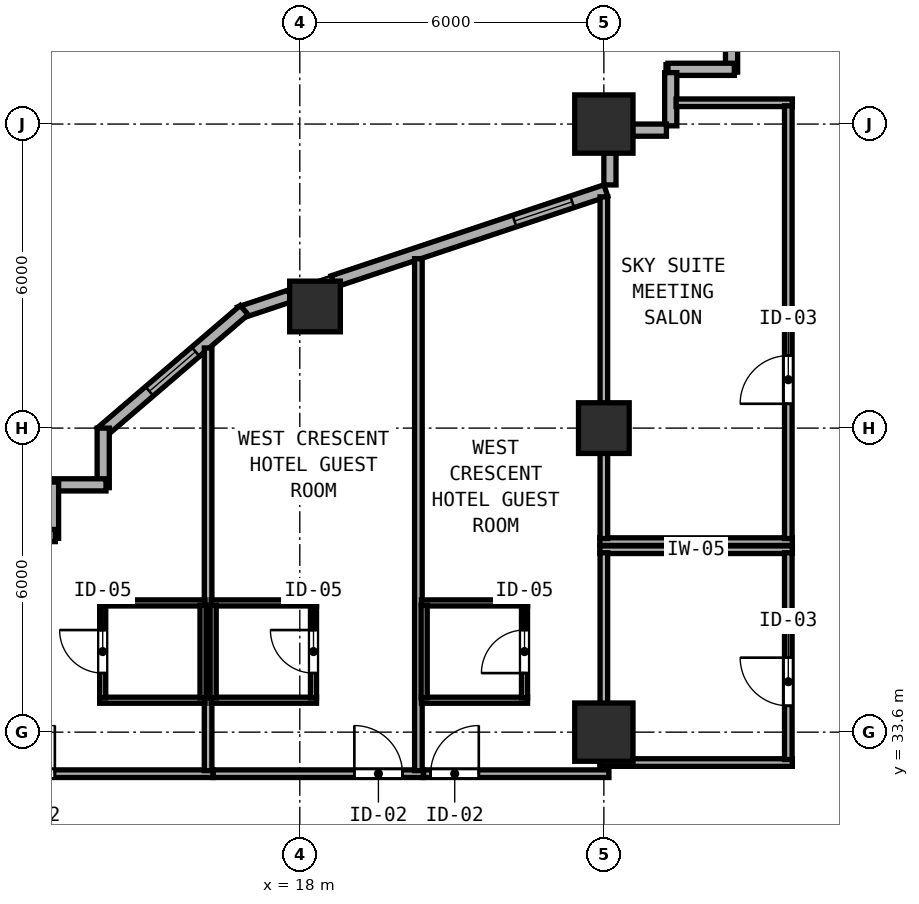
"""IFC4 building model, lengths in metres.
Left out: names, types, materials, properties, quantities, classifications, styles, units other than length and angle.
Written with IfcOpenShell. Run it as: python <this file> out.ifc"""

import sys

from ifc_helpers import new_model, si_unit, direction, frame, frame_2d, origin, origin_2d, place, context, subcontext, project, spatial, rectangle, hollow_rectangle, extrude, element, fill, save


model = new_model("IFC4")
c1 = context("Model", 3, precision=1e-05, world=origin(), true_north=direction((0.0, 1.0)))
c2 = subcontext(c1, "Body", "Model", "MODEL_VIEW")
j1 = project(units=[si_unit("LENGTHUNIT", "METRE"), si_unit("PLANEANGLEUNIT", "RADIAN")], contexts=[c1])
p1 = place(None, origin())
s1 = spatial("IfcSite", under=j1, at=p1, CompositionType="ELEMENT")
p2 = place(p1, origin())
s2 = spatial("IfcBuilding", under=s1, at=p2, CompositionType="ELEMENT")
p3 = place(p2, frame((0.0, 0.0, 81.8)))
s3 = spatial("IfcBuildingStorey", under=s2, at=p3, CompositionType="ELEMENT", Elevation=81.8)
for number, where, z_axis, x_axis in (
    (1, (24.0, 33.6, 0.0), (0.0, 0.0, 1.0), (1.0, 0.0, 0.0)),
    (2, (24.0, 45.6, 0.0), (0.0, 0.0, 1.0), (1.0, 0.0, 0.0)),
):
    element("IfcColumn", number, at=place(p3, frame(where, z_axis=z_axis, x_axis=x_axis)), inside=s3, PredefinedType="COLUMN", context=c2, shape_type="SweptSolid", body=[
        extrude(hollow_rectangle(XDim=1.15, YDim=1.15, WallThickness=0.042, at=origin_2d()), origin(), (0.0, 0.0, 1.0), 3.8),
    ])
for number, where, z_axis, x_axis in (
    (3, (24.0, 39.6, 0.0), (0.0, 0.0, 1.0), (1.0, 0.0, 0.0)),
    (4, (18.3, 42.0, 0.0), (0.0, 0.0, 1.0), (1.0, 0.0, 0.0)),
):
    element("IfcColumn", number, at=place(p3, frame(where, z_axis=z_axis, x_axis=x_axis)), inside=s3, PredefinedType="COLUMN", context=c2, shape_type="SweptSolid", body=[
        extrude(hollow_rectangle(XDim=1.0, YDim=1.0, WallThickness=0.038, at=origin_2d()), origin(), (0.0, 0.0, 1.0), 3.8),
    ])
p4 = place(p3, frame((26.52, 47.995, 0.0), z_axis=(0.0, 0.0, 1.0), x_axis=(0.0, -1.0, 0.0)))
e5 = element("IfcWall", 5, at=p4, inside=s3, PredefinedType="SOLIDWALL", context=c2, shape_type="SweptSolid", body=[
    extrude(rectangle(XDim=1.37, YDim=0.24, at=frame_2d((0.685, 0.0))), origin(), (0.0, 0.0, 1.0), 3.6),
])
p5 = place(p3, frame((26.575, 46.68, 0.0), z_axis=(0.0, 0.0, 1.0), x_axis=(-1.0, 0.0, 0.0)))
e6 = element("IfcWall", 6, at=p5, inside=s3, PredefinedType="SOLIDWALL", context=c2, shape_type="SweptSolid", body=[
    extrude(rectangle(XDim=1.31, YDim=0.24, at=frame_2d((0.655, 0.0))), origin(), (0.0, 0.0, 1.0), 3.6),
])
p6 = place(p3, frame((25.32, 46.615, 0.0), z_axis=(0.0, 0.0, 1.0), x_axis=(0.0, -1.0, 0.0)))
e7 = element("IfcWall", 7, at=p6, inside=s3, PredefinedType="SOLIDWALL", context=c2, shape_type="SweptSolid", body=[
    extrude(rectangle(XDim=1.05, YDim=0.24, at=frame_2d((0.525, 0.0))), origin(), (0.0, 0.0, 1.0), 3.6),
])
p7 = place(p3, frame((25.235, 45.48, 0.0), z_axis=(0.0, 0.0, 1.0), x_axis=(-1.0, 0.0, 0.0)))
e8 = element("IfcWall", 8, at=p7, inside=s3, PredefinedType="SOLIDWALL", context=c2, shape_type="SweptSolid", body=[
    extrude(rectangle(XDim=0.668, YDim=0.24, at=frame_2d((0.334, 0.0))), origin(), (0.0, 0.0, 1.0), 3.6),
])
p8 = place(p3, frame((24.12, 45.033, 0.0), z_axis=(0.0, 0.0, 1.0), x_axis=(0.0, -1.0, 0.0)))
e9 = element("IfcWall", 9, at=p8, inside=s3, PredefinedType="SOLIDWALL", context=c2, shape_type="SweptSolid", body=[
    extrude(rectangle(XDim=0.635, YDim=0.24, at=frame_2d((0.317, 0.0))), origin(), (0.0, 0.0, 1.0), 3.097),
])
p9 = place(p3, frame((24.039, 44.287, 0.0), z_axis=(0.0, 0.0, 1.0), x_axis=(-0.948678995954, -0.316240672014, 0.0)))
e10 = element("IfcWall", 10, at=p9, inside=s3, PredefinedType="SOLIDWALL", context=c2, shape_type="SweptSolid", body=[
    extrude(rectangle(XDim=5.675, YDim=0.24, at=frame_2d((2.837, 0.0))), origin(), (0.0, 0.0, 1.0), 3.097),
])
p10 = place(p9, frame((0.7, 0.0, 0.85)))
e11 = element("IfcOpeningElement", 11, at=p10, cuts=e10, PredefinedType="OPENING", context=c2, shape_type="SweptSolid", body=[
    extrude(rectangle(XDim=1.2, YDim=1.85, at=frame_2d((0.6, 0.925))), frame((0.0, 0.13, 0.0), z_axis=(0.0, -1.0, 0.0), x_axis=(1.0, 0.0, 0.0)), (0.0, 0.0, 1.0), 0.26),
])
p11 = place(p3, frame((17.808, 42.209, 0.0), z_axis=(0.0, 0.0, 1.0), x_axis=(-0.948706457285, -0.316158279832, 0.0)))
e12 = element("IfcWall", 12, at=p11, inside=s3, PredefinedType="SOLIDWALL", context=c2, shape_type="SweptSolid", body=[
    extrude(rectangle(XDim=1.054, YDim=0.24, at=frame_2d((0.527, 0.0))), origin(), (0.0, 0.0, 1.0), 3.6),
])
p12 = place(p3, frame((16.902, 41.929, 0.0), z_axis=(0.0, 0.0, 1.0), x_axis=(-0.759275136126, -0.650769750112, 0.0)))
e13 = element("IfcWall", 13, at=p12, inside=s3, PredefinedType="SOLIDWALL", context=c2, shape_type="SweptSolid", body=[
    extrude(rectangle(XDim=3.719, YDim=0.24, at=frame_2d((1.86, 0.0))), origin(), (0.0, 0.0, 1.0), 3.6),
])
p13 = place(p12, frame((1.263, 0.0, 0.85)))
e14 = element("IfcOpeningElement", 14, at=p13, cuts=e13, PredefinedType="OPENING", context=c2, shape_type="SweptSolid", body=[
    extrude(rectangle(XDim=1.2, YDim=1.85, at=frame_2d((0.6, 0.925))), frame((0.0, 0.13, 0.0), z_axis=(0.0, -1.0, 0.0), x_axis=(1.0, 0.0, 0.0)), (0.0, 0.0, 1.0), 0.26),
])
p14 = place(p3, frame((14.12, 39.6, 0.0), z_axis=(0.0, 0.0, 1.0), x_axis=(0.0, -1.0, 0.0)))
e15 = element("IfcWall", 15, at=p14, inside=s3, PredefinedType="SOLIDWALL", context=c2, shape_type="SweptSolid", body=[
    extrude(rectangle(XDim=1.175, YDim=0.24, at=frame_2d((0.587, 0.0))), origin(), (0.0, 0.0, 1.0), 3.6),
])
p15 = place(p3, frame((14.175, 38.48, 0.0), z_axis=(0.0, 0.0, 1.0), x_axis=(-1.0, 0.0, 0.0)))
e16 = element("IfcWall", 16, at=p15, inside=s3, PredefinedType="SOLIDWALL", context=c2, shape_type="SweptSolid", body=[
    extrude(rectangle(XDim=1.11, YDim=0.24, at=frame_2d((0.555, 0.0))), origin(), (0.0, 0.0, 1.0), 3.6),
])
p16 = place(p3, frame((13.12, 38.535, 0.0), z_axis=(0.0, 0.0, 1.0), x_axis=(0.0, -1.0, 0.0)))
e17 = element("IfcWall", 17, at=p16, inside=s3, PredefinedType="SOLIDWALL", context=c2, shape_type="SweptSolid", body=[
    extrude(rectangle(XDim=1.11, YDim=0.24, at=frame_2d((0.555, 0.0))), origin(), (0.0, 0.0, 1.0), 3.6),
])
p17 = place(p3, frame((13.175, 37.48, 0.0), z_axis=(0.0, 0.0, 1.0), x_axis=(-1.0, 0.0, 0.0)))
e18 = element("IfcWall", 18, at=p17, inside=s3, PredefinedType="SOLIDWALL", context=c2, shape_type="SweptSolid", body=[
    extrude(rectangle(XDim=1.11, YDim=0.24, at=frame_2d((0.555, 0.0))), origin(), (0.0, 0.0, 1.0), 3.6),
])
for number, where, z_axis, x_axis in (
    (19, (23.92, 37.2, 0.0), (0.0, 0.0, 1.0), (1.0, 0.0, 0.0)),
    (20, (23.92, 33.0, 0.0), (0.0, 0.0, 1.0), (1.0, 0.0, 0.0)),
):
    element("IfcWall", number, at=place(p3, frame(where, z_axis=z_axis, x_axis=x_axis)), inside=s3, PredefinedType="PARTITIONING", context=c2, shape_type="SweptSolid", body=[
        extrude(rectangle(XDim=3.8, YDim=0.15, at=frame_2d((1.9, 0.0))), origin(), (0.0, 0.0, 1.0), 3.6),
    ])
p18 = place(p3, frame((24.0, 33.06, 0.0), z_axis=(0.0, 0.0, 1.0), x_axis=(0.0, 1.0, 0.0)))
e21 = element("IfcWall", 21, at=p18, inside=s3, PredefinedType="PARTITIONING", context=c2, shape_type="SweptSolid", body=[
    extrude(rectangle(XDim=4.08, YDim=0.15, at=frame_2d((2.04, 0.0))), origin(), (0.0, 0.0, 1.0), 3.097),
])
p19 = place(p3, frame((27.64, 33.06, 0.0), z_axis=(0.0, 0.0, 1.0), x_axis=(0.0, 1.0, 0.0)))
e22 = element("IfcWall", 22, at=p19, inside=s3, PredefinedType="PARTITIONING", context=c2, shape_type="SweptSolid", body=[
    extrude(rectangle(XDim=4.08, YDim=0.15, at=frame_2d((2.04, 0.0))), origin(), (0.0, 0.0, 1.0), 3.6),
])
p20 = place(p19, frame((2.01, 0.0, 0.0), z_axis=(0.0, 0.0, 1.0), x_axis=(-1.0, 0.0, 0.0)))
e23 = element("IfcOpeningElement", 23, at=p20, cuts=e22, PredefinedType="OPENING", context=c2, shape_type="SweptSolid", body=[
    extrude(rectangle(XDim=0.95, YDim=2.12, at=frame_2d((0.475, 1.06))), frame((0.0, 0.085, 0.0), z_axis=(0.0, -1.0, 0.0), x_axis=(1.0, 0.0, 0.0)), (0.0, 0.0, 1.0), 0.17),
])
p21 = place(p3, frame((25.425, 46.02, 0.0), z_axis=(0.0, 0.0, 1.0), x_axis=(1.0, 0.0, 0.0)))
e24 = element("IfcWall", 24, at=p21, inside=s3, PredefinedType="PARTITIONING", context=c2, shape_type="SweptSolid", body=[
    extrude(rectangle(XDim=2.295, YDim=0.15, at=frame_2d((1.147, 0.0))), origin(), (0.0, 0.0, 1.0), 3.6),
])
p22 = place(p3, frame((23.92, 37.36, 0.0), z_axis=(0.0, 0.0, 1.0), x_axis=(1.0, 0.0, 0.0)))
e25 = element("IfcWall", 25, at=p22, inside=s3, PredefinedType="PARTITIONING", context=c2, shape_type="SweptSolid", body=[
    extrude(rectangle(XDim=3.8, YDim=0.15, at=frame_2d((1.9, 0.0))), origin(), (0.0, 0.0, 1.0), 3.6),
])
p23 = place(p3, frame((24.0, 37.42, 0.0), z_axis=(0.0, 0.0, 1.0), x_axis=(0.0, 1.0, 0.0)))
e26 = element("IfcWall", 26, at=p23, inside=s3, PredefinedType="PARTITIONING", context=c2, shape_type="SweptSolid", body=[
    extrude(rectangle(XDim=6.743, YDim=0.15, at=frame_2d((3.372, 0.0))), origin(), (0.0, 0.0, 1.0), 3.097),
])
p24 = place(p3, frame((27.64, 37.42, 0.0), z_axis=(0.0, 0.0, 1.0), x_axis=(0.0, 1.0, 0.0)))
e27 = element("IfcWall", 27, at=p24, inside=s3, PredefinedType="PARTITIONING", context=c2, shape_type="SweptSolid", body=[
    extrude(rectangle(XDim=8.54, YDim=0.15, at=frame_2d((4.27, 0.0))), origin(), (0.0, 0.0, 1.0), 3.6),
])
p25 = place(p24, frame((3.61, 0.0, 0.0), z_axis=(0.0, 0.0, 1.0), x_axis=(-1.0, 0.0, 0.0)))
e28 = element("IfcOpeningElement", 28, at=p25, cuts=e27, PredefinedType="OPENING", context=c2, shape_type="SweptSolid", body=[
    extrude(rectangle(XDim=0.95, YDim=2.12, at=frame_2d((0.475, 1.06))), frame((0.0, 0.085, 0.0), z_axis=(0.0, -1.0, 0.0), x_axis=(1.0, 0.0, 0.0)), (0.0, 0.0, 1.0), 0.17),
])
p26 = place(p3, frame((11.7, 32.78, 0.0), z_axis=(0.0, 0.0, 1.0), x_axis=(1.0, 0.0, 0.0)))
e29 = element("IfcWall", 29, at=p26, inside=s3, PredefinedType="PARTITIONING", context=c2, shape_type="SweptSolid", body=[
    extrude(rectangle(XDim=4.59, YDim=0.15, at=frame_2d((2.295, 0.0))), origin(), (0.0, 0.0, 1.0), 3.6),
])
p27 = place(p26, frame((0.516, 0.0, 0.0)))
e30 = element("IfcOpeningElement", 30, at=p27, cuts=e29, PredefinedType="OPENING", context=c2, shape_type="SweptSolid", body=[
    extrude(rectangle(XDim=0.95, YDim=2.15, at=frame_2d((0.475, 1.075))), frame((0.0, 0.085, 0.0), z_axis=(0.0, -1.0, 0.0), x_axis=(1.0, 0.0, 0.0)), (0.0, 0.0, 1.0), 0.17),
])
p28 = place(p3, frame((16.19, 32.84, 0.0), z_axis=(0.0, 0.0, 1.0), x_axis=(0.0, 1.0, 0.0)))
e31 = element("IfcWall", 31, at=p28, inside=s3, PredefinedType="PARTITIONING", context=c2, shape_type="SweptSolid", body=[
    extrude(rectangle(XDim=8.341, YDim=0.15, at=frame_2d((4.17, 0.0))), origin(), (0.0, 0.0, 1.0), 3.6),
])
for number, where, z_axis, x_axis in (
    (32, (14.05, 36.15, 0.0), (0.0, 0.0, 1.0), (1.0, 0.0, 0.0)),
    (33, (14.05, 34.23, 0.0), (0.0, 0.0, 1.0), (1.0, 0.0, 0.0)),
):
    element("IfcWall", number, at=place(p3, frame(where, z_axis=z_axis, x_axis=x_axis)), inside=s3, PredefinedType="PARTITIONING", context=c2, shape_type="SweptSolid", body=[
        extrude(rectangle(XDim=2.08, YDim=0.12, at=frame_2d((1.04, 0.0))), origin(), (0.0, 0.0, 1.0), 3.6),
    ])
p29 = place(p3, frame((14.11, 34.275, 0.0), z_axis=(0.0, 0.0, 1.0), x_axis=(0.0, 1.0, 0.0)))
e34 = element("IfcWall", 34, at=p29, inside=s3, PredefinedType="PARTITIONING", context=c2, shape_type="SweptSolid", body=[
    extrude(rectangle(XDim=1.83, YDim=0.12, at=frame_2d((0.915, 0.0))), origin(), (0.0, 0.0, 1.0), 3.6),
])
p30 = place(p29, frame((1.34, 0.0, 0.0), z_axis=(0.0, 0.0, 1.0), x_axis=(-1.0, 0.0, 0.0)))
e35 = element("IfcOpeningElement", 35, at=p30, cuts=e34, PredefinedType="OPENING", context=c2, shape_type="SweptSolid", body=[
    extrude(rectangle(XDim=0.85, YDim=2.1, at=frame_2d((0.425, 1.05))), frame((0.0, 0.07, 0.0), z_axis=(0.0, -1.0, 0.0), x_axis=(1.0, 0.0, 0.0)), (0.0, 0.0, 1.0), 0.14),
])
p31 = place(p3, frame((16.09, 34.275, 0.0), z_axis=(0.0, 0.0, 1.0), x_axis=(0.0, 1.0, 0.0)))
e36 = element("IfcWall", 36, at=p31, inside=s3, PredefinedType="PARTITIONING", context=c2, shape_type="SweptSolid", body=[
    extrude(rectangle(XDim=1.83, YDim=0.12, at=frame_2d((0.915, 0.0))), origin(), (0.0, 0.0, 1.0), 3.6),
])
p32 = place(p3, frame((16.292, 32.78, 0.0), z_axis=(0.0, 0.0, 1.0), x_axis=(1.0, 0.0, 0.0)))
e37 = element("IfcWall", 37, at=p32, inside=s3, PredefinedType="PARTITIONING", context=c2, shape_type="SweptSolid", body=[
    extrude(rectangle(XDim=4.148, YDim=0.15, at=frame_2d((2.074, 0.0))), origin(), (0.0, 0.0, 1.0), 3.6),
])
p33 = place(p32, frame((2.784, 0.0, 0.0)))
e38 = element("IfcOpeningElement", 38, at=p33, cuts=e37, PredefinedType="OPENING", context=c2, shape_type="SweptSolid", body=[
    extrude(rectangle(XDim=0.95, YDim=2.15, at=frame_2d((0.475, 1.075))), frame((0.0, 0.085, 0.0), z_axis=(0.0, -1.0, 0.0), x_axis=(1.0, 0.0, 0.0)), (0.0, 0.0, 1.0), 0.17),
])
p34 = place(p3, frame((20.34, 32.84, 0.0), z_axis=(0.0, 0.0, 1.0), x_axis=(0.0, 1.0, 0.0)))
e39 = element("IfcWall", 39, at=p34, inside=s3, PredefinedType="PARTITIONING", context=c2, shape_type="SweptSolid", body=[
    extrude(rectangle(XDim=10.103, YDim=0.15, at=frame_2d((5.051, 0.0))), origin(), (0.0, 0.0, 1.0), 3.6),
])
for number, where, z_axis, x_axis in (
    (40, (16.25, 36.15, 0.0), (0.0, 0.0, 1.0), (1.0, 0.0, 0.0)),
    (41, (16.25, 34.23, 0.0), (0.0, 0.0, 1.0), (1.0, 0.0, 0.0)),
):
    element("IfcWall", number, at=place(p3, frame(where, z_axis=z_axis, x_axis=x_axis)), inside=s3, PredefinedType="PARTITIONING", context=c2, shape_type="SweptSolid", body=[
        extrude(rectangle(XDim=2.08, YDim=0.12, at=frame_2d((1.04, 0.0))), origin(), (0.0, 0.0, 1.0), 3.6),
    ])
p35 = place(p3, frame((16.29, 34.275, 0.0), z_axis=(0.0, 0.0, 1.0), x_axis=(0.0, 1.0, 0.0)))
e42 = element("IfcWall", 42, at=p35, inside=s3, PredefinedType="PARTITIONING", context=c2, shape_type="SweptSolid", body=[
    extrude(rectangle(XDim=1.83, YDim=0.12, at=frame_2d((0.915, 0.0))), origin(), (0.0, 0.0, 1.0), 3.6),
])
p36 = place(p3, frame((18.27, 34.275, 0.0), z_axis=(0.0, 0.0, 1.0), x_axis=(0.0, 1.0, 0.0)))
e43 = element("IfcWall", 43, at=p36, inside=s3, PredefinedType="PARTITIONING", context=c2, shape_type="SweptSolid", body=[
    extrude(rectangle(XDim=1.83, YDim=0.12, at=frame_2d((0.915, 0.0))), origin(), (0.0, 0.0, 1.0), 3.6),
])
p37 = place(p36, frame((0.49, 0.0, 0.0)))
e44 = element("IfcOpeningElement", 44, at=p37, cuts=e43, PredefinedType="OPENING", context=c2, shape_type="SweptSolid", body=[
    extrude(rectangle(XDim=0.85, YDim=2.1, at=frame_2d((0.425, 1.05))), frame((0.0, 0.07, 0.0), z_axis=(0.0, -1.0, 0.0), x_axis=(1.0, 0.0, 0.0)), (0.0, 0.0, 1.0), 0.14),
])
p38 = place(p3, frame((20.442, 32.78, 0.0), z_axis=(0.0, 0.0, 1.0), x_axis=(1.0, 0.0, 0.0)))
e45 = element("IfcWall", 45, at=p38, inside=s3, PredefinedType="PARTITIONING", context=c2, shape_type="SweptSolid", body=[
    extrude(rectangle(XDim=3.658, YDim=0.15, at=frame_2d((1.829, 0.0))), origin(), (0.0, 0.0, 1.0), 3.6),
])
p39 = place(p38, frame((0.14, 0.0, 0.0)))
e46 = element("IfcOpeningElement", 46, at=p39, cuts=e45, PredefinedType="OPENING", context=c2, shape_type="SweptSolid", body=[
    extrude(rectangle(XDim=0.95, YDim=2.15, at=frame_2d((0.475, 1.075))), frame((0.0, 0.085, 0.0), z_axis=(0.0, -1.0, 0.0), x_axis=(1.0, 0.0, 0.0)), (0.0, 0.0, 1.0), 0.17),
])
for number, where, z_axis, x_axis in (
    (47, (20.4, 36.15, 0.0), (0.0, 0.0, 1.0), (1.0, 0.0, 0.0)),
    (48, (20.4, 34.23, 0.0), (0.0, 0.0, 1.0), (1.0, 0.0, 0.0)),
):
    element("IfcWall", number, at=place(p3, frame(where, z_axis=z_axis, x_axis=x_axis)), inside=s3, PredefinedType="PARTITIONING", context=c2, shape_type="SweptSolid", body=[
        extrude(rectangle(XDim=2.094, YDim=0.12, at=frame_2d((1.047, 0.0))), origin(), (0.0, 0.0, 1.0), 3.6),
    ])
p40 = place(p3, frame((20.454, 34.275, 0.0), z_axis=(0.0, 0.0, 1.0), x_axis=(0.0, 1.0, 0.0)))
e49 = element("IfcWall", 49, at=p40, inside=s3, PredefinedType="PARTITIONING", context=c2, shape_type="SweptSolid", body=[
    extrude(rectangle(XDim=1.83, YDim=0.12, at=frame_2d((0.915, 0.0))), origin(), (0.0, 0.0, 1.0), 3.6),
])
p41 = place(p3, frame((22.434, 34.275, 0.0), z_axis=(0.0, 0.0, 1.0), x_axis=(0.0, 1.0, 0.0)))
e50 = element("IfcWall", 50, at=p41, inside=s3, PredefinedType="PARTITIONING", context=c2, shape_type="SweptSolid", body=[
    extrude(rectangle(XDim=1.83, YDim=0.12, at=frame_2d((0.915, 0.0))), origin(), (0.0, 0.0, 1.0), 3.6),
])
p42 = place(p41, frame((0.49, 0.0, 0.0)))
e51 = element("IfcOpeningElement", 51, at=p42, cuts=e50, PredefinedType="OPENING", context=c2, shape_type="SweptSolid", body=[
    extrude(rectangle(XDim=0.85, YDim=2.1, at=frame_2d((0.425, 1.05))), frame((0.0, 0.07, 0.0), z_axis=(0.0, -1.0, 0.0), x_axis=(1.0, 0.0, 0.0)), (0.0, 0.0, 1.0), 0.14),
])
p43 = place(p10, origin())
e52 = element("IfcWindow", 52, at=p43, inside=s3, PartitioningType="SINGLE_PANEL", PredefinedType="WINDOW", context=c2, shape_type="SweptSolid", body=[
    extrude(rectangle(XDim=1.2, YDim=1.85, at=frame_2d((0.6, 0.925))), frame((0.0, 0.03, 0.0), z_axis=(0.0, -1.0, 0.0), x_axis=(1.0, 0.0, 0.0)), (0.0, 0.0, 1.0), 0.06),
])
fill(e11, e52)
p44 = place(p13, origin())
e53 = element("IfcWindow", 53, at=p44, inside=s3, PartitioningType="SINGLE_PANEL", PredefinedType="WINDOW", context=c2, shape_type="SweptSolid", body=[
    extrude(rectangle(XDim=1.2, YDim=1.85, at=frame_2d((0.6, 0.925))), frame((0.0, 0.03, 0.0), z_axis=(0.0, -1.0, 0.0), x_axis=(1.0, 0.0, 0.0)), (0.0, 0.0, 1.0), 0.06),
])
fill(e14, e53)
p45 = place(p20, origin())
e54 = element("IfcDoor", 54, at=p45, inside=s3, OperationType="SINGLE_SWING_LEFT", PredefinedType="DOOR", context=c2, shape_type="SweptSolid", body=[
    extrude(rectangle(XDim=0.95, YDim=2.12, at=frame_2d((0.475, 1.06))), frame((0.0, 0.025, 0.0), z_axis=(0.0, -1.0, 0.0), x_axis=(1.0, 0.0, 0.0)), (0.0, 0.0, 1.0), 0.05),
])
fill(e23, e54)
p46 = place(p25, origin())
e55 = element("IfcDoor", 55, at=p46, inside=s3, OperationType="SINGLE_SWING_RIGHT", PredefinedType="DOOR", context=c2, shape_type="SweptSolid", body=[
    extrude(rectangle(XDim=0.95, YDim=2.12, at=frame_2d((0.475, 1.06))), frame((0.0, 0.025, 0.0), z_axis=(0.0, -1.0, 0.0), x_axis=(1.0, 0.0, 0.0)), (0.0, 0.0, 1.0), 0.05),
])
fill(e28, e55)
p47 = place(p27, origin())
e56 = element("IfcDoor", 56, at=p47, inside=s3, OperationType="SINGLE_SWING_RIGHT", PredefinedType="DOOR", context=c2, shape_type="SweptSolid", body=[
    extrude(rectangle(XDim=0.95, YDim=2.15, at=frame_2d((0.475, 1.075))), frame((0.0, 0.025, 0.0), z_axis=(0.0, -1.0, 0.0), x_axis=(1.0, 0.0, 0.0)), (0.0, 0.0, 1.0), 0.05),
])
fill(e30, e56)
p48 = place(p30, origin())
e57 = element("IfcDoor", 57, at=p48, inside=s3, OperationType="SINGLE_SWING_LEFT", PredefinedType="DOOR", context=c2, shape_type="SweptSolid", body=[
    extrude(rectangle(XDim=0.85, YDim=2.1, at=frame_2d((0.425, 1.05))), frame((0.0, 0.025, 0.0), z_axis=(0.0, -1.0, 0.0), x_axis=(1.0, 0.0, 0.0)), (0.0, 0.0, 1.0), 0.05),
])
fill(e35, e57)
p49 = place(p33, origin())
e58 = element("IfcDoor", 58, at=p49, inside=s3, OperationType="SINGLE_SWING_LEFT", PredefinedType="DOOR", context=c2, shape_type="SweptSolid", body=[
    extrude(rectangle(XDim=0.95, YDim=2.15, at=frame_2d((0.475, 1.075))), frame((0.0, 0.025, 0.0), z_axis=(0.0, -1.0, 0.0), x_axis=(1.0, 0.0, 0.0)), (0.0, 0.0, 1.0), 0.05),
])
fill(e38, e58)
p50 = place(p37, origin())
e59 = element("IfcDoor", 59, at=p50, inside=s3, OperationType="SINGLE_SWING_RIGHT", PredefinedType="DOOR", context=c2, shape_type="SweptSolid", body=[
    extrude(rectangle(XDim=0.85, YDim=2.1, at=frame_2d((0.425, 1.05))), frame((0.0, 0.025, 0.0), z_axis=(0.0, -1.0, 0.0), x_axis=(1.0, 0.0, 0.0)), (0.0, 0.0, 1.0), 0.05),
])
fill(e44, e59)
p51 = place(p39, origin())
e60 = element("IfcDoor", 60, at=p51, inside=s3, OperationType="SINGLE_SWING_RIGHT", PredefinedType="DOOR", context=c2, shape_type="SweptSolid", body=[
    extrude(rectangle(XDim=0.95, YDim=2.15, at=frame_2d((0.475, 1.075))), frame((0.0, 0.025, 0.0), z_axis=(0.0, -1.0, 0.0), x_axis=(1.0, 0.0, 0.0)), (0.0, 0.0, 1.0), 0.05),
])
fill(e46, e60)
p52 = place(p42, origin())
e61 = element("IfcDoor", 61, at=p52, inside=s3, OperationType="SINGLE_SWING_LEFT", PredefinedType="DOOR", context=c2, shape_type="SweptSolid", body=[
    extrude(rectangle(XDim=0.85, YDim=2.1, at=frame_2d((0.425, 1.05))), frame((0.0, 0.025, 0.0), z_axis=(0.0, -1.0, 0.0), x_axis=(1.0, 0.0, 0.0)), (0.0, 0.0, 1.0), 0.05),
])
fill(e51, e61)
save(model, sys.argv[1])
